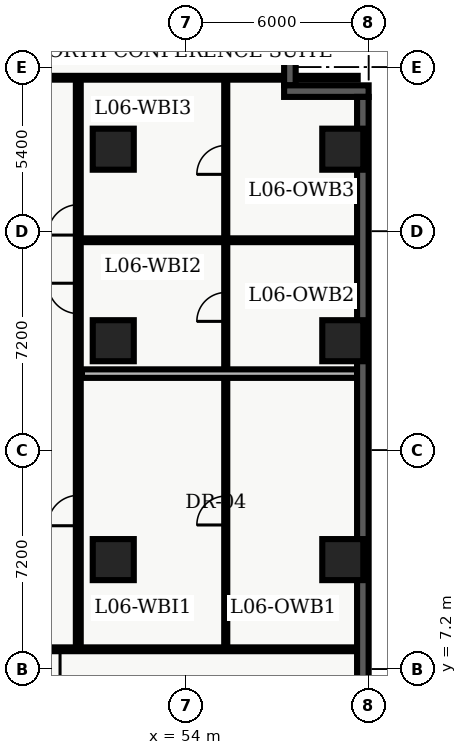
"""IFC4 building model, lengths in metres.
Left out: names, types, materials, properties, quantities, classifications, styles, units other than length and angle.
Written with IfcOpenShell. Run it as: python <this file> out.ifc"""

import sys

from ifc_helpers import new_model, entity, si_unit, converted_unit, direction, frame, origin_with_axes, origin_2d_with_axis, place, context, subcontext, project, spatial, polyline, rectangle, outline, extrude, element, fill, save


model = new_model("IFC4")
c1 = context("Model", 3, precision=1e-05, world=origin_with_axes(), true_north=direction((0.0, 1.0)))
c2 = subcontext(c1, "Body", "Model", "MODEL_VIEW")
j1 = project(units=[si_unit("LENGTHUNIT", "METRE"), converted_unit("PLANEANGLEUNIT", "DEGREE", entity("IfcPlaneAngleMeasure", 0.017), si_unit("PLANEANGLEUNIT", "RADIAN"), dimensions=[0, 0, 0, 0, 0, 0, 0])], contexts=[c1])
p1 = place(None, origin_with_axes())
s1 = spatial("IfcSite", under=j1, at=p1, CompositionType="ELEMENT")
p2 = place(p1, origin_with_axes())
s2 = spatial("IfcBuilding", under=s1, at=p2, CompositionType="ELEMENT")
p3 = place(p2, frame((0.0, 0.0, 28.8), z_axis=(0.0, 0.0, 1.0), x_axis=(1.0, 0.0, 0.0)))
s3 = spatial("IfcBuildingStorey", under=s2, at=p3, CompositionType="ELEMENT", Elevation=28.8)
for number, where, z_axis, x_axis in (
    (1, (51.6, 10.8, 0.0), (0.0, 0.0, 1.0), (1.0, 0.0, 0.0)),
    (2, (51.6, 18.0, 0.0), (0.0, 0.0, 1.0), (1.0, 0.0, 0.0)),
    (3, (51.6, 24.3, 0.0), (0.0, 0.0, 1.0), (1.0, 0.0, 0.0)),
    (4, (59.15, 10.8, 0.0), (0.0, 0.0, 1.0), (1.0, 0.0, 0.0)),
    (5, (59.15, 18.0, 0.0), (0.0, 0.0, 1.0), (1.0, 0.0, 0.0)),
    (6, (59.15, 24.3, 0.0), (0.0, 0.0, 1.0), (1.0, 0.0, 0.0)),
):
    element("IfcColumn", number, at=place(p3, frame(where, z_axis=z_axis, x_axis=x_axis)), inside=s3, PredefinedType="COLUMN", context=c2, shape_type="SweptSolid", body=[
        extrude(rectangle(XDim=1.35, YDim=1.35, at=origin_2d_with_axis()), origin_with_axes(), (0.0, 0.0, 1.0), 3.9),
    ])
p4 = place(p3, frame((50.45, 7.85, 0.0), z_axis=(0.0, 0.0, 1.0), x_axis=(0.0, 1.0, 0.0)))
e7 = element("IfcWall", 7, at=p4, inside=s3, PredefinedType="PARTITIONING", context=c2, shape_type="SweptSolid", body=[
    extrude(outline(polyline([(0.0, -0.08), (18.8, -0.08), (18.8, 0.08), (0.0, 0.08), (0.0, -0.08)])), origin_with_axes(), (0.0, 0.0, 1.0), 2.7),
])
p5 = place(p4, frame((4.564, 0.0, 0.0), z_axis=(0.0, 0.0, 1.0), x_axis=(1.0, 0.0, 0.0)))
e8 = element("IfcOpeningElement", 8, at=p5, cuts=e7, PredefinedType="OPENING", context=c2, shape_type="SweptSolid", body=[
    extrude(rectangle(XDim=1.0, YDim=0.18, at=origin_2d_with_axis()), origin_with_axes(), (0.0, 0.0, 1.0), 2.15),
])
p6 = place(p4, frame((11.541, 0.0, 0.0), z_axis=(0.0, 0.0, 1.0), x_axis=(1.0, 0.0, 0.0)))
e9 = element("IfcOpeningElement", 9, at=p6, cuts=e7, PredefinedType="OPENING", context=c2, shape_type="SweptSolid", body=[
    extrude(rectangle(XDim=1.0, YDim=0.18, at=origin_2d_with_axis()), origin_with_axes(), (0.0, 0.0, 1.0), 2.15),
])
p7 = place(p4, frame((14.125, 0.0, 0.0), z_axis=(0.0, 0.0, 1.0), x_axis=(1.0, 0.0, 0.0)))
e10 = element("IfcOpeningElement", 10, at=p7, cuts=e7, PredefinedType="OPENING", context=c2, shape_type="SweptSolid", body=[
    extrude(rectangle(XDim=1.0, YDim=0.18, at=origin_2d_with_axis()), origin_with_axes(), (0.0, 0.0, 1.0), 2.15),
])
p8 = place(p3, frame((59.64, 7.85, 0.0), z_axis=(0.0, 0.0, 1.0), x_axis=(-1.0, 0.0, 0.0)))
e11 = element("IfcWall", 11, at=p8, inside=s3, PredefinedType="PARTITIONING", context=c2, shape_type="SweptSolid", body=[
    extrude(outline(polyline([(0.0, -0.062), (11.59, -0.062), (11.59, 0.062), (0.0, 0.062), (0.0, -0.062)])), origin_with_axes(), (0.0, 0.0, 1.0), 2.7),
])
p9 = place(p8, frame((10.29, 0.0, 0.0), z_axis=(0.0, 0.0, 1.0), x_axis=(1.0, 0.0, 0.0)))
e12 = element("IfcOpeningElement", 12, at=p9, cuts=e11, PredefinedType="OPENING", context=c2, shape_type="SweptSolid", body=[
    extrude(rectangle(XDim=1.0, YDim=0.145, at=origin_2d_with_axis()), origin_with_axes(), (0.0, 0.0, 1.0), 2.15),
])
p10 = place(p3, frame((38.76, 26.65, 0.0), z_axis=(0.0, 0.0, 1.0), x_axis=(1.0, 0.0, 0.0)))
e13 = element("IfcWall", 13, at=p10, inside=s3, PredefinedType="PARTITIONING", context=c2, shape_type="SweptSolid", body=[
    extrude(outline(polyline([(0.0, -0.062), (20.88, -0.062), (20.88, 0.062), (0.0, 0.062), (0.0, -0.062)])), origin_with_axes(), (0.0, 0.0, 1.0), 2.7),
])
p11 = place(p10, frame((4.24, 0.0, 0.0), z_axis=(0.0, 0.0, 1.0), x_axis=(1.0, 0.0, 0.0)))
e14 = element("IfcOpeningElement", 14, at=p11, cuts=e13, PredefinedType="OPENING", context=c2, shape_type="SweptSolid", body=[
    extrude(rectangle(XDim=1.0, YDim=0.145, at=origin_2d_with_axis()), origin_with_axes(), (0.0, 0.0, 1.0), 2.15),
])
p12 = place(p3, frame((55.3, 7.98, 0.0), z_axis=(0.0, 0.0, 1.0), x_axis=(0.0, 1.0, 0.0)))
e15 = element("IfcWall", 15, at=p12, inside=s3, PredefinedType="PARTITIONING", context=c2, shape_type="SweptSolid", body=[
    extrude(outline(polyline([(0.0, -0.05), (18.54, -0.05), (18.54, 0.05), (0.0, 0.05), (0.0, -0.05)])), origin_with_axes(), (0.0, 0.0, 1.0), 2.7),
])
p13 = place(p12, frame((4.434, 0.0, 0.0), z_axis=(0.0, 0.0, 1.0), x_axis=(1.0, 0.0, 0.0)))
e16 = element("IfcOpeningElement", 16, at=p13, cuts=e15, PredefinedType="OPENING", context=c2, shape_type="SweptSolid", body=[
    extrude(rectangle(XDim=0.95, YDim=0.12, at=origin_2d_with_axis()), origin_with_axes(), (0.0, 0.0, 1.0), 2.15),
])
p14 = place(p12, frame((11.132, 0.0, 0.0), z_axis=(0.0, 0.0, 1.0), x_axis=(1.0, 0.0, 0.0)))
e17 = element("IfcOpeningElement", 17, at=p14, cuts=e15, PredefinedType="OPENING", context=c2, shape_type="SweptSolid", body=[
    extrude(rectangle(XDim=0.95, YDim=0.12, at=origin_2d_with_axis()), origin_with_axes(), (0.0, 0.0, 1.0), 2.15),
])
p15 = place(p12, frame((15.967, 0.0, 0.0), z_axis=(0.0, 0.0, 1.0), x_axis=(1.0, 0.0, 0.0)))
e18 = element("IfcOpeningElement", 18, at=p15, cuts=e15, PredefinedType="OPENING", context=c2, shape_type="SweptSolid", body=[
    extrude(rectangle(XDim=0.95, YDim=0.12, at=origin_2d_with_axis()), origin_with_axes(), (0.0, 0.0, 1.0), 2.15),
])
p16 = place(p3, frame((50.57, 16.918, 0.0), z_axis=(0.0, 0.0, 1.0), x_axis=(1.0, 0.0, 0.0)))
e19 = element("IfcWall", 19, at=p16, inside=s3, PredefinedType="PARTITIONING", context=c2, shape_type="SweptSolid", body=[
    extrude(outline(polyline([(0.0, -0.14), (9.055, -0.14), (9.055, 0.14), (0.0, 0.14), (0.0, -0.14)])), origin_with_axes(), (0.0, 0.0, 1.0), 2.7),
])
p17 = place(p3, frame((50.57, 21.305, 0.0), z_axis=(0.0, 0.0, 1.0), x_axis=(1.0, 0.0, 0.0)))
e20 = element("IfcWall", 20, at=p17, inside=s3, PredefinedType="PARTITIONING", context=c2, shape_type="SweptSolid", body=[
    extrude(outline(polyline([(0.0, -0.062), (9.055, -0.062), (9.055, 0.062), (0.0, 0.062), (0.0, -0.062)])), origin_with_axes(), (0.0, 0.0, 1.0), 2.7),
])
p18 = place(p3, frame((57.41, 28.42, 0.0), z_axis=(0.0, 0.0, 1.0), x_axis=(0.0, -1.0, 0.0)))
e21 = element("IfcWall", 21, at=p18, inside=s3, PredefinedType="SOLIDWALL", context=c2, shape_type="SweptSolid", body=[
    extrude(outline(polyline([(0.0, -0.19), (2.02, -0.19), (2.02, 0.19), (0.0, 0.19), (0.0, -0.19)])), origin_with_axes(), (0.0, 0.0, 1.0), 3.66),
])
p19 = place(p3, frame((57.22, 26.21, 0.0), z_axis=(0.0, 0.0, 1.0), x_axis=(1.0, 0.0, 0.0)))
e22 = element("IfcWall", 22, at=p19, inside=s3, PredefinedType="SOLIDWALL", context=c2, shape_type="SweptSolid", body=[
    extrude(outline(polyline([(0.0, -0.19), (2.78, -0.19), (2.78, 0.19), (0.0, 0.19), (0.0, -0.19)])), origin_with_axes(), (0.0, 0.0, 1.0), 3.66),
])
p20 = place(p3, frame((59.81, 26.02, 0.0), z_axis=(0.0, 0.0, 1.0), x_axis=(0.0, -1.0, 0.0)))
e23 = element("IfcWall", 23, at=p20, inside=s3, PredefinedType="SOLIDWALL", context=c2, shape_type="SweptSolid", body=[
    extrude(outline(polyline([(0.0, -0.19), (23.62, -0.19), (23.62, 0.19), (0.0, 0.19), (0.0, -0.19)])), origin_with_axes(), (0.0, 0.0, 1.0), 3.66),
])
p21 = place(p20, frame((20.218, 0.0, 0.45), z_axis=(0.0, 0.0, 1.0), x_axis=(1.0, 0.0, 0.0)))
e24 = element("IfcOpeningElement", 24, at=p21, cuts=e23, PredefinedType="OPENING", context=c2, shape_type="SweptSolid", body=[
    extrude(rectangle(XDim=2.1, YDim=0.4, at=origin_2d_with_axis()), origin_with_axes(), (0.0, 0.0, 1.0), 2.2),
])
p22 = place(p8, frame((10.29, 0.0, 0.0), z_axis=(0.0, 0.0, 1.0), x_axis=(1.0, 0.0, 0.0)))
e25 = element("IfcDoor", 25, at=p22, inside=s3, OperationType="SINGLE_SWING_LEFT", PredefinedType="DOOR", context=c2, shape_type="SweptSolid", body=[
    extrude(rectangle(XDim=1.0, YDim=0.075, at=origin_2d_with_axis()), origin_with_axes(), (0.0, 0.0, 1.0), 2.15),
])
fill(e12, e25)
p23 = place(p12, frame((4.434, 0.0, 0.0), z_axis=(0.0, 0.0, 1.0), x_axis=(1.0, 0.0, 0.0)))
e26 = element("IfcDoor", 26, at=p23, inside=s3, OperationType="SINGLE_SWING_LEFT", PredefinedType="DOOR", context=c2, shape_type="SweptSolid", body=[
    extrude(rectangle(XDim=0.95, YDim=0.06, at=origin_2d_with_axis()), origin_with_axes(), (0.0, 0.0, 1.0), 2.15),
])
fill(e16, e26)
p24 = place(p4, frame((4.564, 0.0, 0.0), z_axis=(0.0, 0.0, 1.0), x_axis=(1.0, 0.0, 0.0)))
e27 = element("IfcDoor", 27, at=p24, inside=s3, OperationType="SINGLE_SWING_LEFT", PredefinedType="DOOR", context=c2, shape_type="SweptSolid", body=[
    extrude(rectangle(XDim=1.0, YDim=0.09, at=origin_2d_with_axis()), origin_with_axes(), (0.0, 0.0, 1.0), 2.15),
])
fill(e8, e27)
p25 = place(p12, frame((11.132, 0.0, 0.0), z_axis=(0.0, 0.0, 1.0), x_axis=(1.0, 0.0, 0.0)))
e28 = element("IfcDoor", 28, at=p25, inside=s3, OperationType="SINGLE_SWING_LEFT", PredefinedType="DOOR", context=c2, shape_type="SweptSolid", body=[
    extrude(rectangle(XDim=0.95, YDim=0.06, at=origin_2d_with_axis()), origin_with_axes(), (0.0, 0.0, 1.0), 2.15),
])
fill(e17, e28)
p26 = place(p4, frame((11.541, 0.0, 0.0), z_axis=(0.0, 0.0, 1.0), x_axis=(1.0, 0.0, 0.0)))
e29 = element("IfcDoor", 29, at=p26, inside=s3, OperationType="SINGLE_SWING_RIGHT", PredefinedType="DOOR", context=c2, shape_type="SweptSolid", body=[
    extrude(rectangle(XDim=1.0, YDim=0.09, at=origin_2d_with_axis()), origin_with_axes(), (0.0, 0.0, 1.0), 2.15),
])
fill(e9, e29)
p27 = place(p12, frame((15.967, 0.0, 0.0), z_axis=(0.0, 0.0, 1.0), x_axis=(1.0, 0.0, 0.0)))
e30 = element("IfcDoor", 30, at=p27, inside=s3, OperationType="SINGLE_SWING_LEFT", PredefinedType="DOOR", context=c2, shape_type="SweptSolid", body=[
    extrude(rectangle(XDim=0.95, YDim=0.06, at=origin_2d_with_axis()), origin_with_axes(), (0.0, 0.0, 1.0), 2.15),
])
fill(e18, e30)
p28 = place(p4, frame((14.125, 0.0, 0.0), z_axis=(0.0, 0.0, 1.0), x_axis=(1.0, 0.0, 0.0)))
e31 = element("IfcDoor", 31, at=p28, inside=s3, OperationType="SINGLE_SWING_LEFT", PredefinedType="DOOR", context=c2, shape_type="SweptSolid", body=[
    extrude(rectangle(XDim=1.0, YDim=0.09, at=origin_2d_with_axis()), origin_with_axes(), (0.0, 0.0, 1.0), 2.15),
])
fill(e10, e31)
save(model, sys.argv[1])
